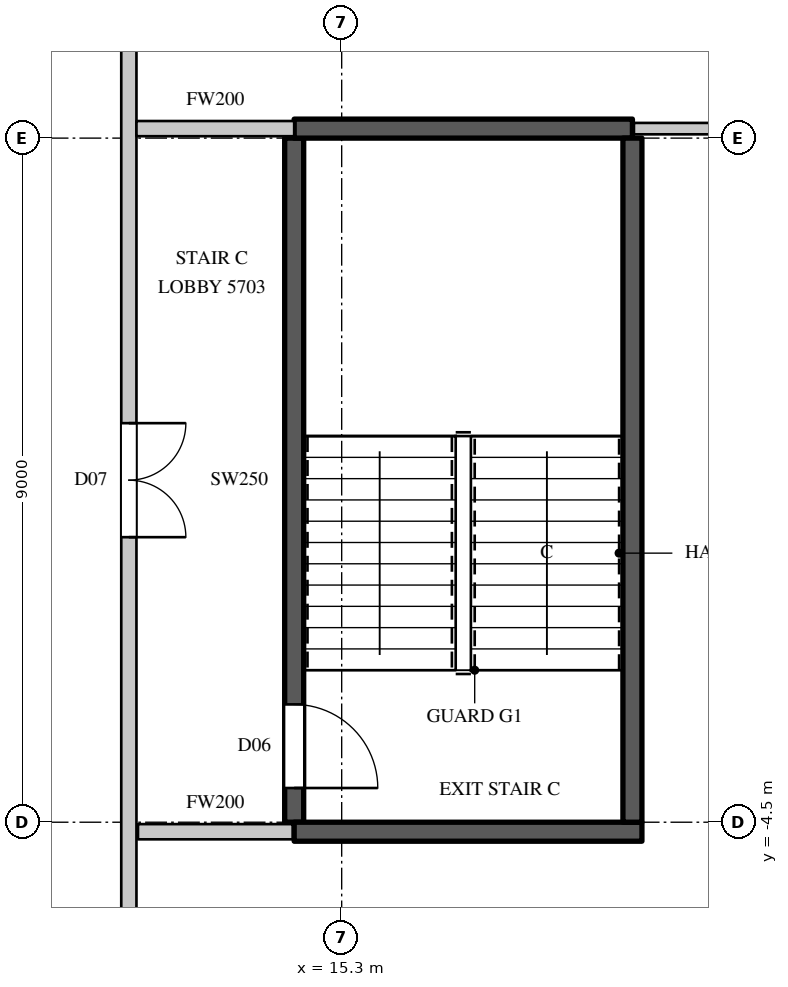
"""IFC4 building model, lengths in metres.
Left out: names, types, materials, properties, quantities, classifications, styles, units other than length and angle.
Written with IfcOpenShell. Run it as: python <this file> out.ifc"""

import sys

from ifc_helpers import new_model, si_unit, direction, frame, frame_2d, origin, place, context, subcontext, project, spatial, rectangle, extrude, element, fill, save


model = new_model("IFC4")
c1 = context("Model", 3, precision=1e-05, world=origin(), true_north=direction((0.0, 1.0)))
c2 = subcontext(c1, "Body", "Model", "MODEL_VIEW")
j1 = project(units=[si_unit("LENGTHUNIT", "METRE"), si_unit("PLANEANGLEUNIT", "RADIAN")], contexts=[c1])
p1 = place(None, origin())
s1 = spatial("IfcSite", under=j1, at=p1, CompositionType="ELEMENT")
p2 = place(p1, origin())
s2 = spatial("IfcBuilding", under=s1, at=p2, CompositionType="ELEMENT")
p3 = place(p2, frame((0.0, 0.0, 255.7)))
s3 = spatial("IfcBuildingStorey", under=s2, at=p3, CompositionType="ELEMENT", Elevation=255.7)
p4 = place(p3, frame((12.5, -13.5, 0.0), z_axis=(0.0, 0.0, 1.0), x_axis=(0.0, 1.0, 0.0)))
e1 = element("IfcWall", 1, at=p4, inside=s3, PredefinedType="PARTITIONING", context=c2, shape_type="SweptSolid", body=[
    extrude(rectangle(XDim=26.9, YDim=0.2, at=frame_2d((13.45, 0.0))), origin(), (0.0, 0.0, 1.0), 3.8),
])
p5 = place(p4, frame((12.75, 0.0, 0.0)))
e2 = element("IfcOpeningElement", 2, at=p5, cuts=e1, PredefinedType="OPENING", context=c2, shape_type="SweptSolid", body=[
    extrude(rectangle(XDim=1.5, YDim=2.4, at=frame_2d((0.75, 1.2))), frame((0.0, 0.11, 0.0), z_axis=(0.0, -1.0, 0.0), x_axis=(1.0, 0.0, 0.0)), (0.0, 0.0, 1.0), 0.22),
])
p6 = place(p3, frame((12.6, 4.625, 0.0), z_axis=(0.0, 0.0, 1.0), x_axis=(1.0, 0.0, 0.0)))
e3 = element("IfcWall", 3, at=p6, inside=s3, PredefinedType="PARTITIONING", context=c2, shape_type="SweptSolid", body=[
    extrude(rectangle(XDim=2.075, YDim=0.2, at=frame_2d((1.038, 0.0))), origin(), (0.0, 0.0, 1.0), 3.8),
])
p7 = place(p3, frame((12.62, -4.625, 0.0), z_axis=(0.0, 0.0, 1.0), x_axis=(1.0, 0.0, 0.0)))
e4 = element("IfcWall", 4, at=p7, inside=s3, PredefinedType="PARTITIONING", context=c2, shape_type="SweptSolid", body=[
    extrude(rectangle(XDim=2.035, YDim=0.2, at=frame_2d((1.018, 0.0))), origin(), (0.0, 0.0, 1.0), 3.8),
])
p8 = place(p3, frame((19.145, 4.625, 0.0), z_axis=(0.0, 0.0, 1.0), x_axis=(1.0, 0.0, 0.0)))
e5 = element("IfcWall", 5, at=p8, inside=s3, PredefinedType="PARTITIONING", context=c2, shape_type="SweptSolid", body=[
    extrude(rectangle(XDim=4.605, YDim=0.15, at=frame_2d((2.302, 0.0))), origin(), (0.0, 0.0, 1.0), 3.8),
])
p9 = place(p3, frame((14.675, -4.5, 0.0), z_axis=(0.0, 0.0, 1.0), x_axis=(0.0, 1.0, 0.0)))
e6 = element("IfcWall", 6, at=p9, inside=s3, PredefinedType="SHEAR", context=c2, shape_type="SweptSolid", body=[
    extrude(rectangle(XDim=9.0, YDim=0.25, at=frame_2d((4.5, 0.0))), origin(), (0.0, 0.0, 1.0), 3.8),
])
p10 = place(p9, frame((0.45, 0.0, 0.0)))
e7 = element("IfcOpeningElement", 7, at=p10, cuts=e6, PredefinedType="OPENING", context=c2, shape_type="SweptSolid", body=[
    extrude(rectangle(XDim=1.1, YDim=2.2, at=frame_2d((0.55, 1.1))), frame((0.0, 0.135, 0.0), z_axis=(0.0, -1.0, 0.0), x_axis=(1.0, 0.0, 0.0)), (0.0, 0.0, 1.0), 0.27),
])
p11 = place(p3, frame((14.675, -4.625, 0.0), z_axis=(0.0, 0.0, 1.0), x_axis=(1.0, 0.0, 0.0)))
e8 = element("IfcWall", 8, at=p11, inside=s3, PredefinedType="SHEAR", context=c2, shape_type="SweptSolid", body=[
    extrude(rectangle(XDim=4.575, YDim=0.25, at=frame_2d((2.288, 0.0))), origin(), (0.0, 0.0, 1.0), 3.8),
])
p12 = place(p3, frame((14.675, 4.625, 0.0), z_axis=(0.0, 0.0, 1.0), x_axis=(1.0, 0.0, 0.0)))
e9 = element("IfcWall", 9, at=p12, inside=s3, PredefinedType="SHEAR", context=c2, shape_type="SweptSolid", body=[
    extrude(rectangle(XDim=4.45, YDim=0.25, at=frame_2d((2.225, 0.0))), origin(), (0.0, 0.0, 1.0), 3.8),
])
p13 = place(p3, frame((19.125, -4.5, 0.0), z_axis=(0.0, 0.0, 1.0), x_axis=(0.0, 1.0, 0.0)))
e10 = element("IfcWall", 10, at=p13, inside=s3, PredefinedType="SHEAR", context=c2, shape_type="SweptSolid", body=[
    extrude(rectangle(XDim=9.0, YDim=0.25, at=frame_2d((4.5, 0.0))), origin(), (0.0, 0.0, 1.0), 3.8),
])
p14 = place(p5, origin())
e11 = element("IfcDoor", 11, at=p14, inside=s3, OperationType="DOUBLE_DOOR_SINGLE_SWING", PredefinedType="DOOR", context=c2, shape_type="SweptSolid", body=[
    extrude(rectangle(XDim=1.5, YDim=2.4, at=frame_2d((0.75, 1.2))), frame((0.0, 0.025, 0.0), z_axis=(0.0, -1.0, 0.0), x_axis=(1.0, 0.0, 0.0)), (0.0, 0.0, 1.0), 0.05),
])
fill(e2, e11)
p15 = place(p10, origin())
e12 = element("IfcDoor", 12, at=p15, inside=s3, OperationType="SINGLE_SWING_RIGHT", PredefinedType="DOOR", context=c2, shape_type="SweptSolid", body=[
    extrude(rectangle(XDim=1.1, YDim=2.2, at=frame_2d((0.55, 1.1))), frame((0.0, 0.025, 0.0), z_axis=(0.0, -1.0, 0.0), x_axis=(1.0, 0.0, 0.0)), (0.0, 0.0, 1.0), 0.05),
])
fill(e7, e12)
save(model, sys.argv[1])
